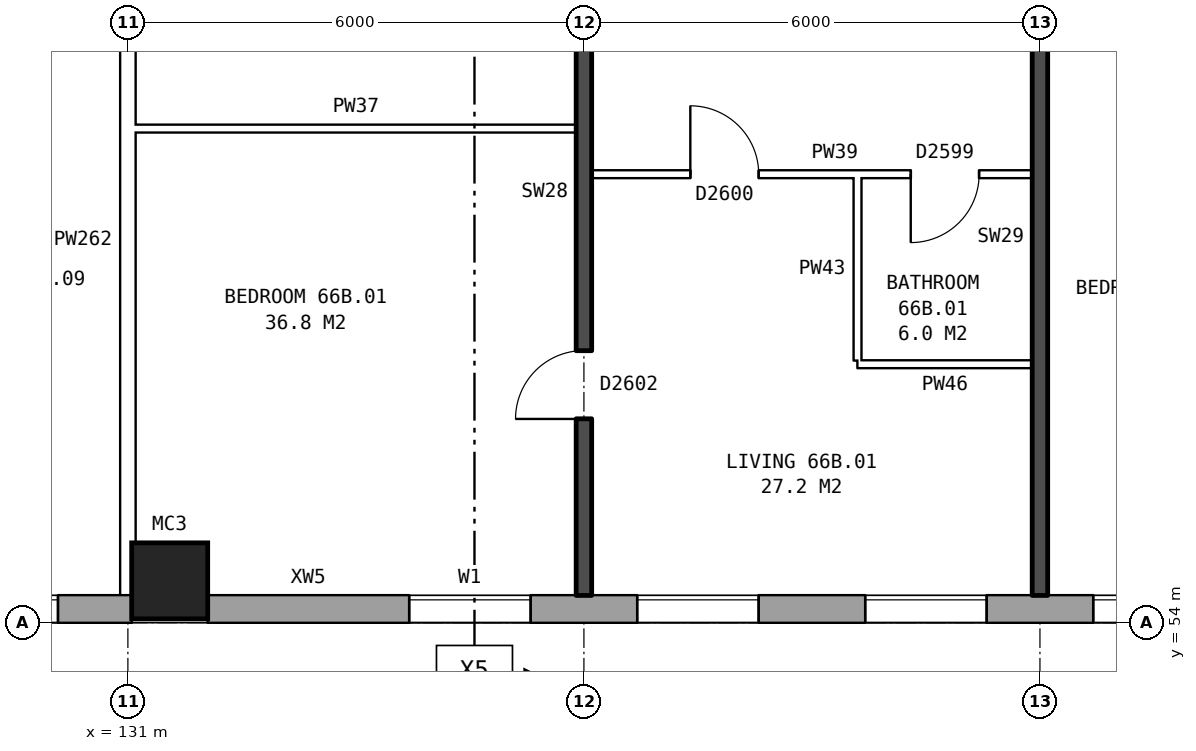
"""IFC4 building model, lengths in metres.
Left out: names, types, materials, properties, quantities, classifications, styles, units other than length and angle.
Written with IfcOpenShell. Run it as: python <this file> out.ifc"""

import sys

from ifc_helpers import new_model, si_unit, direction, frame, frame_2d, origin, origin_2d, place, context, subcontext, project, spatial, rectangle, hollow_rectangle, extrude, element, fill, save


model = new_model("IFC4")
c1 = context("Model", 3, precision=1e-05, world=origin(), true_north=direction((0.0, 1.0)))
c2 = subcontext(c1, "Body", "Model", "MODEL_VIEW")
j1 = project(units=[si_unit("LENGTHUNIT", "METRE"), si_unit("PLANEANGLEUNIT", "RADIAN")], contexts=[c1])
p1 = place(None, origin())
s1 = spatial("IfcSite", under=j1, at=p1, CompositionType="ELEMENT")
p2 = place(p1, origin())
s2 = spatial("IfcBuilding", under=s1, at=p2, CompositionType="ELEMENT")
p3 = place(p2, frame((0.0, 0.0, 233.8)))
s3 = spatial("IfcBuildingStorey", under=s2, at=p3, CompositionType="ELEMENT", Elevation=233.8)
p4 = place(p3, frame((131.55, 54.55, 0.0), z_axis=(0.0, 0.0, 1.0), x_axis=(1.0, 0.0, 0.0)))
e1 = element("IfcColumn", 1, at=p4, inside=s3, PredefinedType="COLUMN", context=c2, shape_type="SweptSolid", body=[
    extrude(hollow_rectangle(XDim=1.0, YDim=1.0, WallThickness=0.055, at=origin_2d()), origin(), (0.0, 0.0, 1.0), 3.1),
])
p5 = place(p3, frame((75.95, 54.18, 0.0), z_axis=(0.0, 0.0, 1.0), x_axis=(1.0, 0.0, 0.0)))
e2 = element("IfcWall", 2, at=p5, inside=s3, PredefinedType="STANDARD", context=c2, shape_type="SweptSolid", body=[
    extrude(rectangle(XDim=55.1, YDim=0.36, at=frame_2d((27.55, 0.0))), origin(), (0.0, 0.0, 1.0), 2.85),
])
p6 = place(p5, frame((0.969, 0.0, 0.8)))
e3 = element("IfcOpeningElement", 3, at=p6, cuts=e2, PredefinedType="OPENING", context=c2, shape_type="SweptSolid", body=[
    extrude(rectangle(XDim=1.6, YDim=1.8, at=frame_2d((0.8, 0.9))), frame((0.0, 0.19, 0.0), z_axis=(0.0, -1.0, 0.0), x_axis=(1.0, 0.0, 0.0)), (0.0, 0.0, 1.0), 0.38),
])
p7 = place(p5, frame((4.406, 0.0, 0.8)))
e4 = element("IfcOpeningElement", 4, at=p7, cuts=e2, PredefinedType="OPENING", context=c2, shape_type="SweptSolid", body=[
    extrude(rectangle(XDim=1.6, YDim=1.8, at=frame_2d((0.8, 0.9))), frame((0.0, 0.19, 0.0), z_axis=(0.0, -1.0, 0.0), x_axis=(1.0, 0.0, 0.0)), (0.0, 0.0, 1.0), 0.38),
])
p8 = place(p5, frame((7.844, 0.0, 0.8)))
e5 = element("IfcOpeningElement", 5, at=p8, cuts=e2, PredefinedType="OPENING", context=c2, shape_type="SweptSolid", body=[
    extrude(rectangle(XDim=1.6, YDim=1.8, at=frame_2d((0.8, 0.9))), frame((0.0, 0.19, 0.0), z_axis=(0.0, -1.0, 0.0), x_axis=(1.0, 0.0, 0.0)), (0.0, 0.0, 1.0), 0.38),
])
p9 = place(p5, frame((11.281, 0.0, 0.8)))
e6 = element("IfcOpeningElement", 6, at=p9, cuts=e2, PredefinedType="OPENING", context=c2, shape_type="SweptSolid", body=[
    extrude(rectangle(XDim=1.6, YDim=1.8, at=frame_2d((0.8, 0.9))), frame((0.0, 0.19, 0.0), z_axis=(0.0, -1.0, 0.0), x_axis=(1.0, 0.0, 0.0)), (0.0, 0.0, 1.0), 0.38),
])
p10 = place(p5, frame((14.719, 0.0, 0.8)))
e7 = element("IfcOpeningElement", 7, at=p10, cuts=e2, PredefinedType="OPENING", context=c2, shape_type="SweptSolid", body=[
    extrude(rectangle(XDim=1.6, YDim=1.8, at=frame_2d((0.8, 0.9))), frame((0.0, 0.19, 0.0), z_axis=(0.0, -1.0, 0.0), x_axis=(1.0, 0.0, 0.0)), (0.0, 0.0, 1.0), 0.38),
])
p11 = place(p5, frame((18.156, 0.0, 0.8)))
e8 = element("IfcOpeningElement", 8, at=p11, cuts=e2, PredefinedType="OPENING", context=c2, shape_type="SweptSolid", body=[
    extrude(rectangle(XDim=1.6, YDim=1.8, at=frame_2d((0.8, 0.9))), frame((0.0, 0.19, 0.0), z_axis=(0.0, -1.0, 0.0), x_axis=(1.0, 0.0, 0.0)), (0.0, 0.0, 1.0), 0.38),
])
p12 = place(p5, frame((21.594, 0.0, 0.8)))
e9 = element("IfcOpeningElement", 9, at=p12, cuts=e2, PredefinedType="OPENING", context=c2, shape_type="SweptSolid", body=[
    extrude(rectangle(XDim=1.6, YDim=1.8, at=frame_2d((0.8, 0.9))), frame((0.0, 0.19, 0.0), z_axis=(0.0, -1.0, 0.0), x_axis=(1.0, 0.0, 0.0)), (0.0, 0.0, 1.0), 0.38),
])
p13 = place(p5, frame((25.031, 0.0, 0.8)))
e10 = element("IfcOpeningElement", 10, at=p13, cuts=e2, PredefinedType="OPENING", context=c2, shape_type="SweptSolid", body=[
    extrude(rectangle(XDim=1.6, YDim=1.8, at=frame_2d((0.8, 0.9))), frame((0.0, 0.19, 0.0), z_axis=(0.0, -1.0, 0.0), x_axis=(1.0, 0.0, 0.0)), (0.0, 0.0, 1.0), 0.38),
])
p14 = place(p5, frame((28.469, 0.0, 0.8)))
e11 = element("IfcOpeningElement", 11, at=p14, cuts=e2, PredefinedType="OPENING", context=c2, shape_type="SweptSolid", body=[
    extrude(rectangle(XDim=1.6, YDim=1.8, at=frame_2d((0.8, 0.9))), frame((0.0, 0.19, 0.0), z_axis=(0.0, -1.0, 0.0), x_axis=(1.0, 0.0, 0.0)), (0.0, 0.0, 1.0), 0.38),
])
p15 = place(p5, frame((31.906, 0.0, 0.8)))
e12 = element("IfcOpeningElement", 12, at=p15, cuts=e2, PredefinedType="OPENING", context=c2, shape_type="SweptSolid", body=[
    extrude(rectangle(XDim=1.6, YDim=1.8, at=frame_2d((0.8, 0.9))), frame((0.0, 0.19, 0.0), z_axis=(0.0, -1.0, 0.0), x_axis=(1.0, 0.0, 0.0)), (0.0, 0.0, 1.0), 0.38),
])
p16 = place(p5, frame((35.344, 0.0, 0.8)))
e13 = element("IfcOpeningElement", 13, at=p16, cuts=e2, PredefinedType="OPENING", context=c2, shape_type="SweptSolid", body=[
    extrude(rectangle(XDim=1.6, YDim=1.8, at=frame_2d((0.8, 0.9))), frame((0.0, 0.19, 0.0), z_axis=(0.0, -1.0, 0.0), x_axis=(1.0, 0.0, 0.0)), (0.0, 0.0, 1.0), 0.38),
])
p17 = place(p5, frame((38.781, 0.0, 0.8)))
e14 = element("IfcOpeningElement", 14, at=p17, cuts=e2, PredefinedType="OPENING", context=c2, shape_type="SweptSolid", body=[
    extrude(rectangle(XDim=1.6, YDim=1.8, at=frame_2d((0.8, 0.9))), frame((0.0, 0.19, 0.0), z_axis=(0.0, -1.0, 0.0), x_axis=(1.0, 0.0, 0.0)), (0.0, 0.0, 1.0), 0.38),
])
p18 = place(p5, frame((42.219, 0.0, 0.8)))
e15 = element("IfcOpeningElement", 15, at=p18, cuts=e2, PredefinedType="OPENING", context=c2, shape_type="SweptSolid", body=[
    extrude(rectangle(XDim=1.6, YDim=1.8, at=frame_2d((0.8, 0.9))), frame((0.0, 0.19, 0.0), z_axis=(0.0, -1.0, 0.0), x_axis=(1.0, 0.0, 0.0)), (0.0, 0.0, 1.0), 0.38),
])
p19 = place(p5, frame((45.656, 0.0, 0.8)))
e16 = element("IfcOpeningElement", 16, at=p19, cuts=e2, PredefinedType="OPENING", context=c2, shape_type="SweptSolid", body=[
    extrude(rectangle(XDim=1.6, YDim=1.8, at=frame_2d((0.8, 0.9))), frame((0.0, 0.19, 0.0), z_axis=(0.0, -1.0, 0.0), x_axis=(1.0, 0.0, 0.0)), (0.0, 0.0, 1.0), 0.38),
])
p20 = place(p5, frame((49.094, 0.0, 0.8)))
e17 = element("IfcOpeningElement", 17, at=p20, cuts=e2, PredefinedType="OPENING", context=c2, shape_type="SweptSolid", body=[
    extrude(rectangle(XDim=1.6, YDim=1.8, at=frame_2d((0.8, 0.9))), frame((0.0, 0.19, 0.0), z_axis=(0.0, -1.0, 0.0), x_axis=(1.0, 0.0, 0.0)), (0.0, 0.0, 1.0), 0.38),
])
p21 = place(p5, frame((52.531, 0.0, 0.8)))
e18 = element("IfcOpeningElement", 18, at=p21, cuts=e2, PredefinedType="OPENING", context=c2, shape_type="SweptSolid", body=[
    extrude(rectangle(XDim=1.6, YDim=1.8, at=frame_2d((0.8, 0.9))), frame((0.0, 0.19, 0.0), z_axis=(0.0, -1.0, 0.0), x_axis=(1.0, 0.0, 0.0)), (0.0, 0.0, 1.0), 0.38),
])
p22 = place(p3, frame((132.05, 54.18, 0.0), z_axis=(0.0, 0.0, 1.0), x_axis=(1.0, 0.0, 0.0)))
e19 = element("IfcWall", 19, at=p22, inside=s3, PredefinedType="STANDARD", context=c2, shape_type="SweptSolid", body=[
    extrude(rectangle(XDim=33.875, YDim=0.36, at=frame_2d((16.938, 0.0))), origin(), (0.0, 0.0, 1.0), 2.85),
])
p23 = place(p22, frame((2.65, 0.0, 0.8)))
e20 = element("IfcOpeningElement", 20, at=p23, cuts=e19, PredefinedType="OPENING", context=c2, shape_type="SweptSolid", body=[
    extrude(rectangle(XDim=1.6, YDim=1.8, at=frame_2d((0.8, 0.9))), frame((0.0, 0.19, 0.0), z_axis=(0.0, -1.0, 0.0), x_axis=(1.0, 0.0, 0.0)), (0.0, 0.0, 1.0), 0.38),
])
p24 = place(p22, frame((5.65, 0.0, 0.8)))
e21 = element("IfcOpeningElement", 21, at=p24, cuts=e19, PredefinedType="OPENING", context=c2, shape_type="SweptSolid", body=[
    extrude(rectangle(XDim=1.6, YDim=1.8, at=frame_2d((0.8, 0.9))), frame((0.0, 0.19, 0.0), z_axis=(0.0, -1.0, 0.0), x_axis=(1.0, 0.0, 0.0)), (0.0, 0.0, 1.0), 0.38),
])
p25 = place(p22, frame((8.65, 0.0, 0.8)))
e22 = element("IfcOpeningElement", 22, at=p25, cuts=e19, PredefinedType="OPENING", context=c2, shape_type="SweptSolid", body=[
    extrude(rectangle(XDim=1.6, YDim=1.8, at=frame_2d((0.8, 0.9))), frame((0.0, 0.19, 0.0), z_axis=(0.0, -1.0, 0.0), x_axis=(1.0, 0.0, 0.0)), (0.0, 0.0, 1.0), 0.38),
])
p26 = place(p22, frame((11.65, 0.0, 0.8)))
e23 = element("IfcOpeningElement", 23, at=p26, cuts=e19, PredefinedType="OPENING", context=c2, shape_type="SweptSolid", body=[
    extrude(rectangle(XDim=1.6, YDim=1.8, at=frame_2d((0.8, 0.9))), frame((0.0, 0.19, 0.0), z_axis=(0.0, -1.0, 0.0), x_axis=(1.0, 0.0, 0.0)), (0.0, 0.0, 1.0), 0.38),
])
p27 = place(p22, frame((14.65, 0.0, 0.8)))
e24 = element("IfcOpeningElement", 24, at=p27, cuts=e19, PredefinedType="OPENING", context=c2, shape_type="SweptSolid", body=[
    extrude(rectangle(XDim=1.6, YDim=1.8, at=frame_2d((0.8, 0.9))), frame((0.0, 0.19, 0.0), z_axis=(0.0, -1.0, 0.0), x_axis=(1.0, 0.0, 0.0)), (0.0, 0.0, 1.0), 0.38),
])
p28 = place(p22, frame((17.6, 0.0, 0.15)))
e25 = element("IfcOpeningElement", 25, at=p28, cuts=e19, PredefinedType="OPENING", context=c2, shape_type="SweptSolid", body=[
    extrude(rectangle(XDim=0.6, YDim=0.9, at=frame_2d((0.3, 0.45))), frame((0.0, 0.19, 0.0), z_axis=(0.0, -1.0, 0.0), x_axis=(1.0, 0.0, 0.0)), (0.0, 0.0, 1.0), 0.38),
])
p29 = place(p22, frame((20.65, 0.0, 0.8)))
e26 = element("IfcOpeningElement", 26, at=p29, cuts=e19, PredefinedType="OPENING", context=c2, shape_type="SweptSolid", body=[
    extrude(rectangle(XDim=1.6, YDim=1.8, at=frame_2d((0.8, 0.9))), frame((0.0, 0.19, 0.0), z_axis=(0.0, -1.0, 0.0), x_axis=(1.0, 0.0, 0.0)), (0.0, 0.0, 1.0), 0.38),
])
p30 = place(p22, frame((23.65, 0.0, 0.8)))
e27 = element("IfcOpeningElement", 27, at=p30, cuts=e19, PredefinedType="OPENING", context=c2, shape_type="SweptSolid", body=[
    extrude(rectangle(XDim=1.6, YDim=1.8, at=frame_2d((0.8, 0.9))), frame((0.0, 0.19, 0.0), z_axis=(0.0, -1.0, 0.0), x_axis=(1.0, 0.0, 0.0)), (0.0, 0.0, 1.0), 0.38),
])
p31 = place(p22, frame((26.65, 0.0, 0.8)))
e28 = element("IfcOpeningElement", 28, at=p31, cuts=e19, PredefinedType="OPENING", context=c2, shape_type="SweptSolid", body=[
    extrude(rectangle(XDim=1.6, YDim=1.8, at=frame_2d((0.8, 0.9))), frame((0.0, 0.19, 0.0), z_axis=(0.0, -1.0, 0.0), x_axis=(1.0, 0.0, 0.0)), (0.0, 0.0, 1.0), 0.38),
])
p32 = place(p22, frame((29.65, 0.0, 0.8)))
e29 = element("IfcOpeningElement", 29, at=p32, cuts=e19, PredefinedType="OPENING", context=c2, shape_type="SweptSolid", body=[
    extrude(rectangle(XDim=1.6, YDim=1.8, at=frame_2d((0.8, 0.9))), frame((0.0, 0.19, 0.0), z_axis=(0.0, -1.0, 0.0), x_axis=(1.0, 0.0, 0.0)), (0.0, 0.0, 1.0), 0.38),
])
p33 = place(p22, frame((19.1, 0.0, 1.65)))
e30 = element("IfcOpeningElement", 30, at=p33, cuts=e19, PredefinedType="OPENING", context=c2, shape_type="SweptSolid", body=[
    extrude(rectangle(XDim=0.6, YDim=0.9, at=frame_2d((0.3, 0.45))), frame((0.0, 0.19, 0.0), z_axis=(0.0, -1.0, 0.0), x_axis=(1.0, 0.0, 0.0)), (0.0, 0.0, 1.0), 0.38),
])
p34 = place(p3, frame((140.6, 57.4, 0.0), z_axis=(0.0, 0.0, 1.0), x_axis=(1.0, 0.0, 0.0)))
e31 = element("IfcWall", 31, at=p34, inside=s3, PredefinedType="PARTITIONING", context=c2, shape_type="SweptSolid", body=[
    extrude(rectangle(XDim=2.3, YDim=0.1, at=frame_2d((1.15, 0.0))), origin(), (0.0, 0.0, 1.0), 2.85),
])
p35 = place(p3, frame((137.1, 59.9, 0.0), z_axis=(0.0, 0.0, 1.0), x_axis=(1.0, 0.0, 0.0)))
e32 = element("IfcWall", 32, at=p35, inside=s3, PredefinedType="PARTITIONING", context=c2, shape_type="SweptSolid", body=[
    extrude(rectangle(XDim=5.8, YDim=0.1, at=frame_2d((2.9, 0.0))), origin(), (0.0, 0.0, 1.0), 2.85),
])
p36 = place(p35, frame((1.3, 0.0, 0.0)))
e33 = element("IfcOpeningElement", 33, at=p36, cuts=e32, PredefinedType="OPENING", context=c2, shape_type="SweptSolid", body=[
    extrude(rectangle(XDim=0.9, YDim=2.1, at=frame_2d((0.45, 1.05))), frame((0.0, 0.06, 0.0), z_axis=(0.0, -1.0, 0.0), x_axis=(1.0, 0.0, 0.0)), (0.0, 0.0, 1.0), 0.12),
])
p37 = place(p35, frame((4.2, 0.0, 0.0)))
e34 = element("IfcOpeningElement", 34, at=p37, cuts=e32, PredefinedType="OPENING", context=c2, shape_type="SweptSolid", body=[
    extrude(rectangle(XDim=0.9, YDim=2.1, at=frame_2d((0.45, 1.05))), frame((0.0, 0.06, 0.0), z_axis=(0.0, -1.0, 0.0), x_axis=(1.0, 0.0, 0.0)), (0.0, 0.0, 1.0), 0.12),
])
p38 = place(p3, frame((131.1, 60.5, 0.0), z_axis=(0.0, 0.0, 1.0), x_axis=(1.0, 0.0, 0.0)))
e35 = element("IfcWall", 35, at=p38, inside=s3, PredefinedType="PARTITIONING", context=c2, shape_type="SweptSolid", body=[
    extrude(rectangle(XDim=5.8, YDim=0.1, at=frame_2d((2.9, 0.0))), origin(), (0.0, 0.0, 1.0), 2.85),
])
p39 = place(p3, frame((131.0, 54.36, 0.0), z_axis=(0.0, 0.0, 1.0), x_axis=(0.0, 1.0, 0.0)))
e36 = element("IfcWall", 36, at=p39, inside=s3, PredefinedType="PARTITIONING", context=c2, shape_type="SweptSolid", body=[
    extrude(rectangle(XDim=9.34, YDim=0.2, at=frame_2d((4.67, 0.0))), origin(), (0.0, 0.0, 1.0), 2.85),
])
p40 = place(p3, frame((137.0, 54.36, 0.0), z_axis=(0.0, 0.0, 1.0), x_axis=(0.0, 1.0, 0.0)))
e37 = element("IfcWall", 37, at=p40, inside=s3, PredefinedType="SOLIDWALL", context=c2, shape_type="SweptSolid", body=[
    extrude(rectangle(XDim=9.44, YDim=0.2, at=frame_2d((4.72, 0.0))), origin(), (0.0, 0.0, 1.0), 2.85),
])
p41 = place(p40, frame((2.32, 0.0, 0.0)))
e38 = element("IfcOpeningElement", 38, at=p41, cuts=e37, PredefinedType="OPENING", context=c2, shape_type="SweptSolid", body=[
    extrude(rectangle(XDim=0.9, YDim=2.1, at=frame_2d((0.45, 1.05))), frame((0.0, 0.11, 0.0), z_axis=(0.0, -1.0, 0.0), x_axis=(1.0, 0.0, 0.0)), (0.0, 0.0, 1.0), 0.22),
])
p42 = place(p40, frame((7.39, 0.0, 0.0)))
e39 = element("IfcOpeningElement", 39, at=p42, cuts=e37, PredefinedType="OPENING", context=c2, shape_type="SweptSolid", body=[
    extrude(rectangle(XDim=0.8, YDim=2.1, at=frame_2d((0.4, 1.05))), frame((0.0, 0.11, 0.0), z_axis=(0.0, -1.0, 0.0), x_axis=(1.0, 0.0, 0.0)), (0.0, 0.0, 1.0), 0.22),
])
p43 = place(p3, frame((140.6, 57.45, 0.0), z_axis=(0.0, 0.0, 1.0), x_axis=(0.0, 1.0, 0.0)))
e40 = element("IfcWall", 40, at=p43, inside=s3, PredefinedType="PARTITIONING", context=c2, shape_type="SweptSolid", body=[
    extrude(rectangle(XDim=2.4, YDim=0.1, at=frame_2d((1.2, 0.0))), origin(), (0.0, 0.0, 1.0), 2.85),
])
p44 = place(p3, frame((143.0, 54.36, 0.0), z_axis=(0.0, 0.0, 1.0), x_axis=(0.0, 1.0, 0.0)))
e41 = element("IfcWall", 41, at=p44, inside=s3, PredefinedType="SOLIDWALL", context=c2, shape_type="SweptSolid", body=[
    extrude(rectangle(XDim=9.44, YDim=0.2, at=frame_2d((4.72, 0.0))), origin(), (0.0, 0.0, 1.0), 2.85),
])
p45 = place(p21, origin())
e42 = element("IfcWindow", 42, at=p45, inside=s3, PartitioningType="SINGLE_PANEL", PredefinedType="WINDOW", context=c2, shape_type="SweptSolid", body=[
    extrude(rectangle(XDim=1.6, YDim=1.8, at=frame_2d((0.8, 0.9))), frame((0.0, 0.15, 0.0), z_axis=(0.0, -1.0, 0.0), x_axis=(1.0, 0.0, 0.0)), (0.0, 0.0, 1.0), 0.06),
])
fill(e18, e42)
p46 = place(p23, origin())
e43 = element("IfcWindow", 43, at=p46, inside=s3, PartitioningType="SINGLE_PANEL", PredefinedType="WINDOW", context=c2, shape_type="SweptSolid", body=[
    extrude(rectangle(XDim=1.6, YDim=1.8, at=frame_2d((0.8, 0.9))), frame((0.0, 0.15, 0.0), z_axis=(0.0, -1.0, 0.0), x_axis=(1.0, 0.0, 0.0)), (0.0, 0.0, 1.0), 0.06),
])
fill(e20, e43)
p47 = place(p24, origin())
e44 = element("IfcWindow", 44, at=p47, inside=s3, PartitioningType="SINGLE_PANEL", PredefinedType="WINDOW", context=c2, shape_type="SweptSolid", body=[
    extrude(rectangle(XDim=1.6, YDim=1.8, at=frame_2d((0.8, 0.9))), frame((0.0, 0.15, 0.0), z_axis=(0.0, -1.0, 0.0), x_axis=(1.0, 0.0, 0.0)), (0.0, 0.0, 1.0), 0.06),
])
fill(e21, e44)
p48 = place(p25, origin())
e45 = element("IfcWindow", 45, at=p48, inside=s3, PartitioningType="SINGLE_PANEL", PredefinedType="WINDOW", context=c2, shape_type="SweptSolid", body=[
    extrude(rectangle(XDim=1.6, YDim=1.8, at=frame_2d((0.8, 0.9))), frame((0.0, 0.15, 0.0), z_axis=(0.0, -1.0, 0.0), x_axis=(1.0, 0.0, 0.0)), (0.0, 0.0, 1.0), 0.06),
])
fill(e22, e45)
p49 = place(p26, origin())
e46 = element("IfcWindow", 46, at=p49, inside=s3, PartitioningType="SINGLE_PANEL", PredefinedType="WINDOW", context=c2, shape_type="SweptSolid", body=[
    extrude(rectangle(XDim=1.6, YDim=1.8, at=frame_2d((0.8, 0.9))), frame((0.0, 0.15, 0.0), z_axis=(0.0, -1.0, 0.0), x_axis=(1.0, 0.0, 0.0)), (0.0, 0.0, 1.0), 0.06),
])
fill(e23, e46)
p50 = place(p41, origin())
e47 = element("IfcDoor", 47, at=p50, inside=s3, OperationType="SINGLE_SWING_LEFT", PredefinedType="DOOR", context=c2, shape_type="SweptSolid", body=[
    extrude(rectangle(XDim=0.9, YDim=2.1, at=frame_2d((0.45, 1.05))), frame((0.0, 0.025, 0.0), z_axis=(0.0, -1.0, 0.0), x_axis=(1.0, 0.0, 0.0)), (0.0, 0.0, 1.0), 0.05),
])
fill(e38, e47)
p51 = place(p36, origin())
e48 = element("IfcDoor", 48, at=p51, inside=s3, OperationType="SINGLE_SWING_LEFT", PredefinedType="DOOR", context=c2, shape_type="SweptSolid", body=[
    extrude(rectangle(XDim=0.9, YDim=2.1, at=frame_2d((0.45, 1.05))), frame((0.0, 0.025, 0.0), z_axis=(0.0, -1.0, 0.0), x_axis=(1.0, 0.0, 0.0)), (0.0, 0.0, 1.0), 0.05),
])
fill(e33, e48)
p52 = place(p37, frame((0.9, 0.0, 0.0), z_axis=(0.0, 0.0, 1.0), x_axis=(-1.0, 0.0, 0.0)))
e49 = element("IfcDoor", 49, at=p52, inside=s3, OperationType="SINGLE_SWING_RIGHT", PredefinedType="DOOR", context=c2, shape_type="SweptSolid", body=[
    extrude(rectangle(XDim=0.9, YDim=2.1, at=frame_2d((0.45, 1.05))), frame((0.0, 0.025, 0.0), z_axis=(0.0, -1.0, 0.0), x_axis=(1.0, 0.0, 0.0)), (0.0, 0.0, 1.0), 0.05),
])
fill(e34, e49)
save(model, sys.argv[1])
